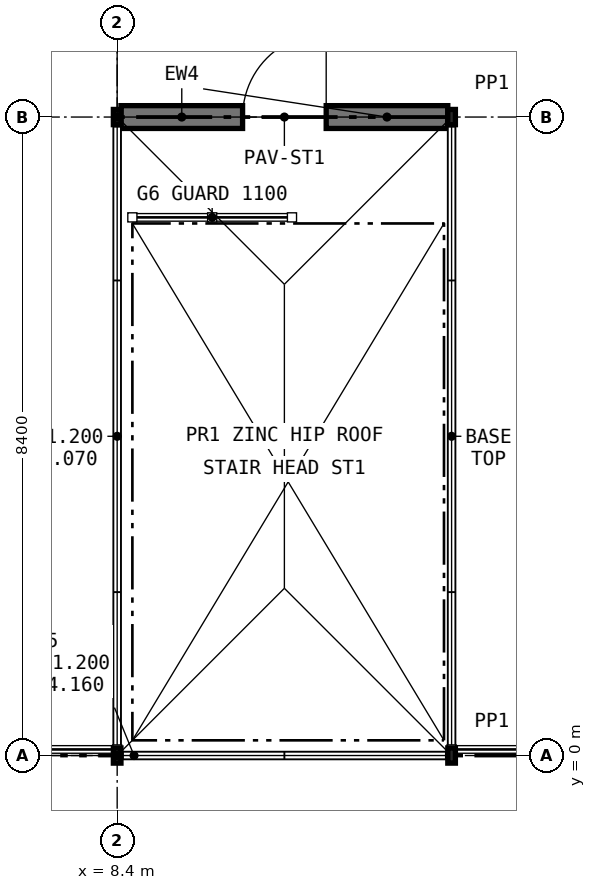
"""IFC4 building model, lengths in metres.
Left out: names, types, materials, properties, quantities, classifications, styles, units other than length and angle.
Written with IfcOpenShell. Run it as: python <this file> out.ifc"""

import sys

from ifc_helpers import new_model, si_unit, direction, frame, frame_2d, origin, origin_2d, place, context, subcontext, project, spatial, rectangle, hollow_rectangle, extrude, element, fill, save


model = new_model("IFC4")
c1 = context("Model", 3, precision=1e-05, world=origin(), true_north=direction((0.0, 1.0)))
c2 = subcontext(c1, "Body", "Model", "MODEL_VIEW")
j1 = project(units=[si_unit("LENGTHUNIT", "METRE"), si_unit("PLANEANGLEUNIT", "RADIAN")], contexts=[c1])
p1 = place(None, origin())
s1 = spatial("IfcSite", under=j1, at=p1, CompositionType="ELEMENT")
p2 = place(p1, origin())
s2 = spatial("IfcBuilding", under=s1, at=p2, CompositionType="ELEMENT")
p3 = place(p2, frame((0.0, 0.0, 31.2)))
s3 = spatial("IfcBuildingStorey", under=s2, at=p3, CompositionType="ELEMENT", Elevation=31.2)
p4 = place(p3, frame((8.4, 0.0, 0.0), z_axis=(0.0, 0.0, 1.0), x_axis=(1.0, 0.0, 0.0)))
e1 = element("IfcColumn", 1, at=p4, inside=s3, PredefinedType="COLUMN", context=c2, shape_type="SweptSolid", body=[
    extrude(hollow_rectangle(XDim=0.1, YDim=0.2, WallThickness=0.008, at=origin_2d()), origin(), (0.0, 0.0, 1.0), 3.2),
])
p5 = place(p3, frame((12.8, 0.0, -0.2), z_axis=(0.0, 0.0, 1.0), x_axis=(1.0, 0.0, 0.0)))
e2 = element("IfcColumn", 2, at=p5, inside=s3, PredefinedType="COLUMN", context=c2, shape_type="SweptSolid", body=[
    extrude(hollow_rectangle(XDim=0.1, YDim=0.2, WallThickness=0.008, at=origin_2d()), origin(), (0.0, 0.0, 1.0), 3.4),
])
p6 = place(p3, frame((8.4, 8.4, 0.0), z_axis=(0.0, 0.0, 1.0), x_axis=(1.0, 0.0, 0.0)))
e3 = element("IfcColumn", 3, at=p6, inside=s3, PredefinedType="COLUMN", context=c2, shape_type="SweptSolid", body=[
    extrude(hollow_rectangle(XDim=0.1, YDim=0.2, WallThickness=0.008, at=origin_2d()), origin(), (0.0, 0.0, 1.0), 3.2),
])
p7 = place(p3, frame((12.8, 8.4, -0.2), z_axis=(0.0, 0.0, 1.0), x_axis=(1.0, 0.0, 0.0)))
e4 = element("IfcColumn", 4, at=p7, inside=s3, PredefinedType="COLUMN", context=c2, shape_type="SweptSolid", body=[
    extrude(hollow_rectangle(XDim=0.1, YDim=0.2, WallThickness=0.008, at=origin_2d()), origin(), (0.0, 0.0, 1.0), 3.4),
])
p8 = place(p3, frame((8.45, 8.4, 0.0), z_axis=(0.0, 0.0, 1.0), x_axis=(1.0, 0.0, 0.0)))
e5 = element("IfcWall", 5, at=p8, inside=s3, PredefinedType="STANDARD", context=c2, shape_type="SweptSolid", body=[
    extrude(rectangle(XDim=4.3, YDim=0.3, at=frame_2d((2.15, 0.0))), origin(), (0.0, 0.0, 1.0), 3.2),
])
p9 = place(p8, frame((1.6, 0.0, 0.0)))
e6 = element("IfcOpeningElement", 6, at=p9, cuts=e5, PredefinedType="OPENING", context=c2, shape_type="SweptSolid", body=[
    extrude(rectangle(XDim=1.1, YDim=2.1, at=frame_2d((0.55, 1.05))), frame((0.0, 0.16, 0.0), z_axis=(0.0, -1.0, 0.0), x_axis=(1.0, 0.0, 0.0)), (0.0, 0.0, 1.0), 0.32),
])
p10 = place(p9, origin())
e7 = element("IfcDoor", 7, at=p10, inside=s3, OperationType="SINGLE_SWING_RIGHT", PredefinedType="DOOR", context=c2, shape_type="SweptSolid", body=[
    extrude(rectangle(XDim=1.1, YDim=2.1, at=frame_2d((0.55, 1.05))), frame((0.0, 0.025, 0.0), z_axis=(0.0, -1.0, 0.0), x_axis=(1.0, 0.0, 0.0)), (0.0, 0.0, 1.0), 0.05),
])
fill(e6, e7)
save(model, sys.argv[1])
